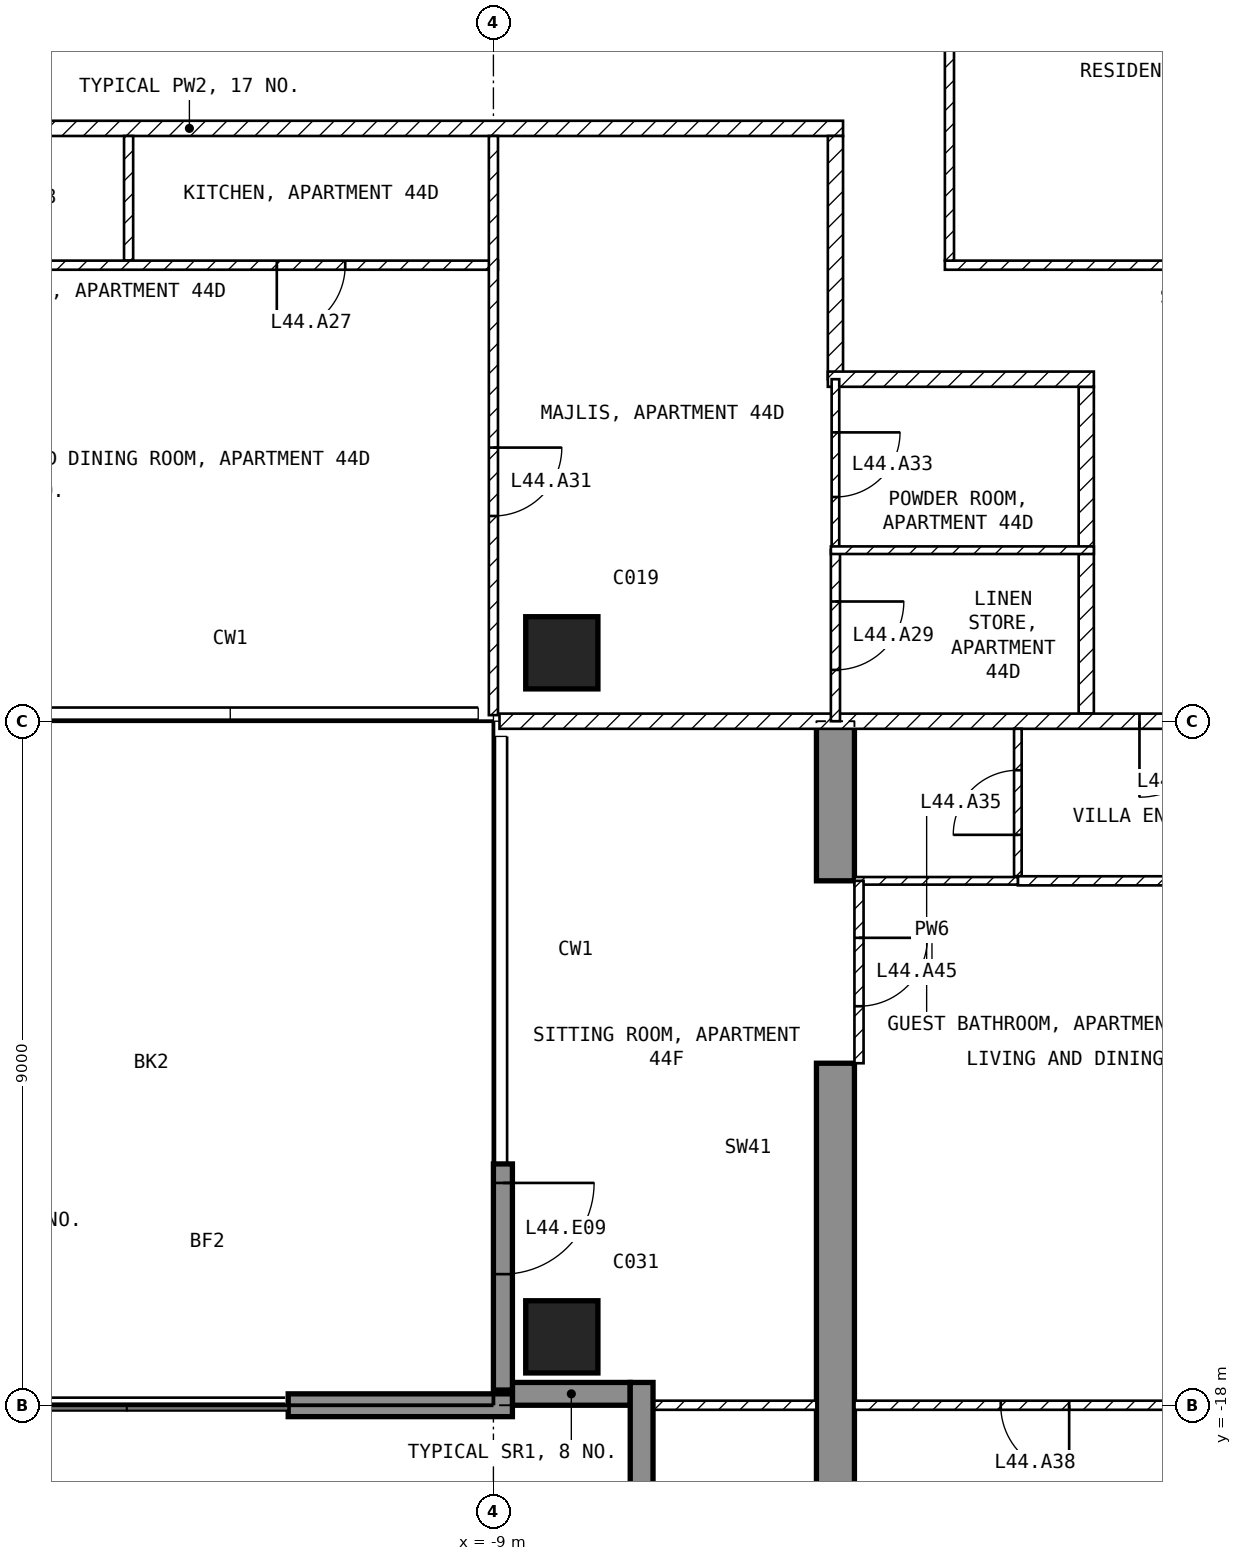
"""IFC4 building model, lengths in metres.
Left out: names, types, materials, properties, quantities, classifications, styles, units other than length and angle.
Written with IfcOpenShell. Run it as: python <this file> out.ifc"""

import sys

from ifc_helpers import new_model, si_unit, direction, frame, frame_2d, origin, origin_2d, place, context, subcontext, project, spatial, polyline, rectangle, outline, extrude, element, fill, save


model = new_model("IFC4")
c1 = context("Model", 3, precision=1e-05, world=origin(), true_north=direction((0.0, 1.0)))
c2 = subcontext(c1, "Body", "Model", "MODEL_VIEW")
j1 = project(units=[si_unit("LENGTHUNIT", "METRE"), si_unit("PLANEANGLEUNIT", "RADIAN")], contexts=[c1])
p1 = place(None, origin())
s1 = spatial("IfcSite", under=j1, at=p1, CompositionType="ELEMENT")
p2 = place(p1, origin())
s2 = spatial("IfcBuilding", under=s1, at=p2, CompositionType="ELEMENT")
p3 = place(p2, frame((0.0, 0.0, 180.6)))
s3 = spatial("IfcBuildingStorey", under=s2, at=p3, CompositionType="ELEMENT", Elevation=180.6)
for number, where, z_axis, x_axis in (
    (1, (-8.1, -17.1, -0.25), (0.0, 0.0, 1.0), (1.0, 0.0, 0.0)),
    (2, (-8.1, -8.1, -0.25), (0.0, 0.0, 1.0), (1.0, 0.0, 0.0)),
):
    element("IfcColumn", number, at=place(p3, frame(where, z_axis=z_axis, x_axis=x_axis)), inside=s3, PredefinedType="COLUMN", context=c2, shape_type="SweptSolid", body=[
        extrude(rectangle(XDim=0.95, YDim=0.95, at=origin_2d()), origin(), (0.0, 0.0, 1.0), 3.5),
    ])
p4 = place(p3, frame((-4.75, -20.225, -0.25), z_axis=(1.0, 0.0, 0.0), x_axis=(0.0, 1.0, 0.0)))
e3 = element("IfcWall", 3, at=p4, inside=s3, PredefinedType="SHEAR", context=c2, shape_type="SweptSolid", body=[
    extrude(outline(polyline([(0.0, 0.0), (6.725, 0.0), (6.725, 2.65), (9.125, 2.65), (9.125, 0.0), (11.225, 0.0), (11.225, 3.5), (0.0, 3.5), (0.0, 0.0)])), origin(), (0.0, 0.0, 1.0), 0.5),
])
p5 = place(p3, frame((-8.875, -14.825, 0.0), z_axis=(0.0, 0.0, 1.0), x_axis=(0.0, -1.0, 0.0)))
e4 = element("IfcWall", 4, at=p5, inside=s3, PredefinedType="SOLIDWALL", context=c2, shape_type="SweptSolid", body=[
    extrude(rectangle(XDim=2.975, YDim=0.25, at=frame_2d((1.488, 0.0))), origin(), (0.0, 0.0, 1.0), 3.25),
])
p6 = place(p5, frame((0.25, 0.0, 0.0)))
e5 = element("IfcOpeningElement", 5, at=p6, cuts=e4, PredefinedType="OPENING", context=c2, shape_type="SweptSolid", body=[
    extrude(rectangle(XDim=1.2, YDim=2.4, at=frame_2d((0.6, 1.2))), frame((0.0, 0.135, 0.0), z_axis=(0.0, -1.0, 0.0), x_axis=(1.0, 0.0, 0.0)), (0.0, 0.0, 1.0), 0.27),
])
p7 = place(p3, frame((-8.75, -17.85, 0.0), z_axis=(0.0, 0.0, 1.0), x_axis=(1.0, 0.0, 0.0)))
e6 = element("IfcWall", 6, at=p7, inside=s3, PredefinedType="SOLIDWALL", context=c2, shape_type="SweptSolid", body=[
    extrude(rectangle(XDim=1.55, YDim=0.3, at=frame_2d((0.775, 0.0))), origin(), (0.0, 0.0, 1.0), 3.25),
])
p8 = place(p3, frame((-7.05, -17.7, 0.0), z_axis=(0.0, 0.0, 1.0), x_axis=(0.0, -1.0, 0.0)))
e7 = element("IfcWall", 7, at=p8, inside=s3, PredefinedType="SOLIDWALL", context=c2, shape_type="SweptSolid", body=[
    extrude(rectangle(XDim=1.8, YDim=0.3, at=frame_2d((0.9, 0.0))), origin(), (0.0, 0.0, 1.0), 3.25),
])
p9 = place(p3, frame((-8.75, -18.0, 0.0), z_axis=(0.0, 0.0, 1.0), x_axis=(-1.0, 0.0, 0.0)))
e8 = element("IfcWall", 8, at=p9, inside=s3, PredefinedType="SOLIDWALL", context=c2, shape_type="SweptSolid", body=[
    extrude(rectangle(XDim=2.95, YDim=0.3, at=frame_2d((1.475, 0.0))), origin(), (0.0, 0.0, 1.0), 3.25),
])
p10 = place(p3, frame((-3.06, -3.0, 0.0), z_axis=(0.0, 0.0, 1.0), x_axis=(1.0, 0.0, 0.0)))
e9 = element("IfcWall", 9, at=p10, inside=s3, PredefinedType="PARTITIONING", context=c2, shape_type="SweptSolid", body=[
    extrude(rectangle(XDim=6.12, YDim=0.12, at=frame_2d((3.06, 0.0))), origin(), (0.0, 0.0, 1.0), 3.25),
])
p11 = place(p3, frame((-3.0, 2.94, 0.0), z_axis=(0.0, 0.0, 1.0), x_axis=(0.0, -1.0, 0.0)))
e10 = element("IfcWall", 10, at=p11, inside=s3, PredefinedType="PARTITIONING", context=c2, shape_type="SweptSolid", body=[
    extrude(rectangle(XDim=5.88, YDim=0.12, at=frame_2d((2.94, 0.0))), origin(), (0.0, 0.0, 1.0), 3.25),
])
p12 = place(p3, frame((-4.4, -1.2, 0.0), z_axis=(0.0, 0.0, 1.0), x_axis=(-1.0, 0.0, 0.0)))
e11 = element("IfcWall", 11, at=p12, inside=s3, PredefinedType="PARTITIONING", context=c2, shape_type="SweptSolid", body=[
    extrude(rectangle(XDim=17.2, YDim=0.2, at=frame_2d((8.6, 0.0))), origin(), (0.0, 0.0, 1.0), 3.25),
])
p13 = place(p12, frame((12.35, 0.0, 0.0)))
e12 = element("IfcOpeningElement", 12, at=p13, cuts=e11, PredefinedType="OPENING", context=c2, shape_type="SweptSolid", body=[
    extrude(rectangle(XDim=1.0, YDim=2.1, at=frame_2d((0.5, 1.05))), frame((0.0, 0.11, 0.0), z_axis=(0.0, -1.0, 0.0), x_axis=(1.0, 0.0, 0.0)), (0.0, 0.0, 1.0), 0.22),
])
p14 = place(p3, frame((-4.5, -4.5, 0.0), z_axis=(0.0, 0.0, 1.0), x_axis=(0.0, 1.0, 0.0)))
e13 = element("IfcWall", 13, at=p14, inside=s3, PredefinedType="PARTITIONING", context=c2, shape_type="SweptSolid", body=[
    extrude(rectangle(XDim=3.2, YDim=0.2, at=frame_2d((1.6, 0.0))), origin(), (0.0, 0.0, 1.0), 3.25),
])
p15 = place(p3, frame((-1.2, -8.9, 0.0), z_axis=(0.0, 0.0, 1.0), x_axis=(0.0, 1.0, 0.0)))
e14 = element("IfcWall", 14, at=p15, inside=s3, PredefinedType="PARTITIONING", context=c2, shape_type="SweptSolid", body=[
    extrude(rectangle(XDim=4.3, YDim=0.2, at=frame_2d((2.15, 0.0))), origin(), (0.0, 0.0, 1.0), 3.25),
])
p16 = place(p3, frame((-1.1, -4.5, 0.0), z_axis=(0.0, 0.0, 1.0), x_axis=(-1.0, 0.0, 0.0)))
e15 = element("IfcWall", 15, at=p16, inside=s3, PredefinedType="PARTITIONING", context=c2, shape_type="SweptSolid", body=[
    extrude(rectangle(XDim=3.5, YDim=0.2, at=frame_2d((1.75, 0.0))), origin(), (0.0, 0.0, 1.0), 3.25),
])
p17 = place(p3, frame((8.92, -9.0, 0.0), z_axis=(0.0, 0.0, 1.0), x_axis=(-1.0, 0.0, 0.0)))
e16 = element("IfcWall", 16, at=p17, inside=s3, PredefinedType="PARTITIONING", context=c2, shape_type="SweptSolid", body=[
    extrude(rectangle(XDim=17.84, YDim=0.2, at=frame_2d((8.92, 0.0))), origin(), (0.0, 0.0, 1.0), 3.25),
])
p18 = place(p17, frame((8.42, 0.0, 0.0)))
e17 = element("IfcOpeningElement", 17, at=p18, cuts=e16, PredefinedType="OPENING", context=c2, shape_type="SweptSolid", body=[
    extrude(rectangle(XDim=1.0, YDim=2.1, at=frame_2d((0.5, 1.05))), frame((0.0, 0.11, 0.0), z_axis=(0.0, -1.0, 0.0), x_axis=(1.0, 0.0, 0.0)), (0.0, 0.0, 1.0), 0.22),
])
p19 = place(p3, frame((-13.8, -2.94, 0.0), z_axis=(0.0, 0.0, 1.0), x_axis=(0.0, 1.0, 0.0)))
e18 = element("IfcWall", 18, at=p19, inside=s3, PredefinedType="PARTITIONING", context=c2, shape_type="SweptSolid", body=[
    extrude(rectangle(XDim=1.64, YDim=0.12, at=frame_2d((0.82, 0.0))), origin(), (0.0, 0.0, 1.0), 3.25),
])
p20 = place(p3, frame((-8.94, -3.0, 0.0), z_axis=(0.0, 0.0, 1.0), x_axis=(-1.0, 0.0, 0.0)))
e19 = element("IfcWall", 19, at=p20, inside=s3, PredefinedType="PARTITIONING", context=c2, shape_type="SweptSolid", body=[
    extrude(rectangle(XDim=9.51, YDim=0.12, at=frame_2d((4.755, 0.0))), origin(), (0.0, 0.0, 1.0), 3.25),
])
p21 = place(p20, frame((2.01, 0.0, 0.0)))
e20 = element("IfcOpeningElement", 20, at=p21, cuts=e19, PredefinedType="OPENING", context=c2, shape_type="SweptSolid", body=[
    extrude(rectangle(XDim=0.9, YDim=2.1, at=frame_2d((0.45, 1.05))), frame((0.0, 0.07, 0.0), z_axis=(0.0, -1.0, 0.0), x_axis=(1.0, 0.0, 0.0)), (0.0, 0.0, 1.0), 0.14),
])
p22 = place(p20, frame((7.635, 0.0, 0.0)))
e21 = element("IfcOpeningElement", 21, at=p22, cuts=e19, PredefinedType="OPENING", context=c2, shape_type="SweptSolid", body=[
    extrude(rectangle(XDim=0.9, YDim=2.1, at=frame_2d((0.45, 1.05))), frame((0.0, 0.07, 0.0), z_axis=(0.0, -1.0, 0.0), x_axis=(1.0, 0.0, 0.0)), (0.0, 0.0, 1.0), 0.14),
])
p23 = place(p3, frame((-9.0, -1.3, 0.0), z_axis=(0.0, 0.0, 1.0), x_axis=(0.0, -1.0, 0.0)))
e22 = element("IfcWall", 22, at=p23, inside=s3, PredefinedType="PARTITIONING", context=c2, shape_type="SweptSolid", body=[
    extrude(rectangle(XDim=7.62, YDim=0.12, at=frame_2d((3.81, 0.0))), origin(), (0.0, 0.0, 1.0), 3.25),
])
p24 = place(p23, frame((4.1, 0.0, 0.0)))
e23 = element("IfcOpeningElement", 23, at=p24, cuts=e22, PredefinedType="OPENING", context=c2, shape_type="SweptSolid", body=[
    extrude(rectangle(XDim=0.9, YDim=2.1, at=frame_2d((0.45, 1.05))), frame((0.0, 0.07, 0.0), z_axis=(0.0, -1.0, 0.0), x_axis=(1.0, 0.0, 0.0)), (0.0, 0.0, 1.0), 0.14),
])
p25 = place(p3, frame((-4.5, -4.5, 0.0), z_axis=(0.0, 0.0, 1.0), x_axis=(0.0, -1.0, 0.0)))
e24 = element("IfcWall", 24, at=p25, inside=s3, PredefinedType="PARTITIONING", context=c2, shape_type="SweptSolid", body=[
    extrude(rectangle(XDim=2.25, YDim=0.1, at=frame_2d((1.125, 0.0))), origin(), (0.0, 0.0, 1.0), 3.25),
])
p26 = place(p25, frame((0.7, 0.0, 0.0)))
e25 = element("IfcOpeningElement", 25, at=p26, cuts=e24, PredefinedType="OPENING", context=c2, shape_type="SweptSolid", body=[
    extrude(rectangle(XDim=0.85, YDim=2.1, at=frame_2d((0.425, 1.05))), frame((0.0, 0.06, 0.0), z_axis=(0.0, -1.0, 0.0), x_axis=(1.0, 0.0, 0.0)), (0.0, 0.0, 1.0), 0.12),
])
p27 = place(p3, frame((-4.5, -6.75, 0.0), z_axis=(0.0, 0.0, 1.0), x_axis=(0.0, -1.0, 0.0)))
e26 = element("IfcWall", 26, at=p27, inside=s3, PredefinedType="PARTITIONING", context=c2, shape_type="SweptSolid", body=[
    extrude(rectangle(XDim=2.25, YDim=0.12, at=frame_2d((1.125, 0.0))), origin(), (0.0, 0.0, 1.0), 3.25),
])
p28 = place(p27, frame((0.675, 0.0, 0.0)))
e27 = element("IfcOpeningElement", 27, at=p28, cuts=e26, PredefinedType="OPENING", context=c2, shape_type="SweptSolid", body=[
    extrude(rectangle(XDim=0.9, YDim=2.1, at=frame_2d((0.45, 1.05))), frame((0.0, 0.07, 0.0), z_axis=(0.0, -1.0, 0.0), x_axis=(1.0, 0.0, 0.0)), (0.0, 0.0, 1.0), 0.14),
])
p29 = place(p3, frame((-1.1, -6.75, 0.0), z_axis=(0.0, 0.0, 1.0), x_axis=(-1.0, 0.0, 0.0)))
e28 = element("IfcWall", 28, at=p29, inside=s3, PredefinedType="PARTITIONING", context=c2, shape_type="SweptSolid", body=[
    extrude(rectangle(XDim=3.46, YDim=0.1, at=frame_2d((1.73, 0.0))), origin(), (0.0, 0.0, 1.0), 3.25),
])
p30 = place(p3, frame((-2.1, -11.04, 0.0), z_axis=(0.0, 0.0, 1.0), x_axis=(0.0, 1.0, 0.0)))
e29 = element("IfcWall", 29, at=p30, inside=s3, PredefinedType="PARTITIONING", context=c2, shape_type="SweptSolid", body=[
    extrude(rectangle(XDim=1.94, YDim=0.1, at=frame_2d((0.97, 0.0))), origin(), (0.0, 0.0, 1.0), 3.25),
])
p31 = place(p30, frame((0.545, 0.0, 0.0)))
e30 = element("IfcOpeningElement", 30, at=p31, cuts=e29, PredefinedType="OPENING", context=c2, shape_type="SweptSolid", body=[
    extrude(rectangle(XDim=0.85, YDim=2.1, at=frame_2d((0.425, 1.05))), frame((0.0, 0.06, 0.0), z_axis=(0.0, -1.0, 0.0), x_axis=(1.0, 0.0, 0.0)), (0.0, 0.0, 1.0), 0.12),
])
p32 = place(p3, frame((4.25, -11.1, 0.0), z_axis=(0.0, 0.0, 1.0), x_axis=(-1.0, 0.0, 0.0)))
e31 = element("IfcWall", 31, at=p32, inside=s3, PredefinedType="PARTITIONING", context=c2, shape_type="SweptSolid", body=[
    extrude(rectangle(XDim=6.35, YDim=0.12, at=frame_2d((3.175, 0.0))), origin(), (0.0, 0.0, 1.0), 3.25),
])
p33 = place(p32, frame((2.725, 0.0, 0.0)))
e32 = element("IfcOpeningElement", 32, at=p33, cuts=e31, PredefinedType="OPENING", context=c2, shape_type="SweptSolid", body=[
    extrude(rectangle(XDim=0.9, YDim=2.1, at=frame_2d((0.45, 1.05))), frame((0.0, 0.07, 0.0), z_axis=(0.0, -1.0, 0.0), x_axis=(1.0, 0.0, 0.0)), (0.0, 0.0, 1.0), 0.14),
])
p34 = place(p3, frame((-2.1, -11.1, 0.0), z_axis=(0.0, 0.0, 1.0), x_axis=(-1.0, 0.0, 0.0)))
e33 = element("IfcWall", 33, at=p34, inside=s3, PredefinedType="PARTITIONING", context=c2, shape_type="SweptSolid", body=[
    extrude(rectangle(XDim=2.15, YDim=0.1, at=frame_2d((1.075, 0.0))), origin(), (0.0, 0.0, 1.0), 3.25),
])
p35 = place(p3, frame((4.25, -18.0, 0.0), z_axis=(0.0, 0.0, 1.0), x_axis=(-1.0, 0.0, 0.0)))
e34 = element("IfcWall", 34, at=p35, inside=s3, PredefinedType="PARTITIONING", context=c2, shape_type="SweptSolid", body=[
    extrude(rectangle(XDim=8.5, YDim=0.12, at=frame_2d((4.25, 0.0))), origin(), (0.0, 0.0, 1.0), 3.25),
])
p36 = place(p35, frame((5.675, 0.0, 0.0)))
e35 = element("IfcOpeningElement", 35, at=p36, cuts=e34, PredefinedType="OPENING", context=c2, shape_type="SweptSolid", body=[
    extrude(rectangle(XDim=0.9, YDim=2.1, at=frame_2d((0.45, 1.05))), frame((0.0, 0.07, 0.0), z_axis=(0.0, -1.0, 0.0), x_axis=(1.0, 0.0, 0.0)), (0.0, 0.0, 1.0), 0.14),
])
p37 = place(p3, frame((-4.75, -18.0, 0.0), z_axis=(0.0, 0.0, 1.0), x_axis=(-1.0, 0.0, 0.0)))
e36 = element("IfcWall", 36, at=p37, inside=s3, PredefinedType="PARTITIONING", context=c2, shape_type="SweptSolid", body=[
    extrude(rectangle(XDim=2.37, YDim=0.12, at=frame_2d((1.185, 0.0))), origin(), (0.0, 0.0, 1.0), 3.25),
])
p38 = place(p3, frame((-4.19, -11.1, 0.0), z_axis=(0.0, 0.0, 1.0), x_axis=(0.0, -1.0, 0.0)))
e37 = element("IfcWall", 37, at=p38, inside=s3, PredefinedType="PARTITIONING", context=c2, shape_type="SweptSolid", body=[
    extrude(rectangle(XDim=2.4, YDim=0.12, at=frame_2d((1.2, 0.0))), origin(), (0.0, 0.0, 1.0), 2.4),
])
p39 = place(p38, frame((0.75, 0.0, 0.0)))
e38 = element("IfcOpeningElement", 38, at=p39, cuts=e37, PredefinedType="OPENING", context=c2, shape_type="SweptSolid", body=[
    extrude(rectangle(XDim=0.9, YDim=2.1, at=frame_2d((0.45, 1.05))), frame((0.0, 0.07, 0.0), z_axis=(0.0, -1.0, 0.0), x_axis=(1.0, 0.0, 0.0)), (0.0, 0.0, 1.0), 0.14),
])
p40 = place(p6, origin())
e39 = element("IfcDoor", 39, at=p40, inside=s3, OperationType="SINGLE_SWING_LEFT", PredefinedType="DOOR", context=c2, shape_type="SweptSolid", body=[
    extrude(rectangle(XDim=1.2, YDim=2.4, at=frame_2d((0.6, 1.2))), frame((0.0, 0.025, 0.0), z_axis=(0.0, -1.0, 0.0), x_axis=(1.0, 0.0, 0.0)), (0.0, 0.0, 1.0), 0.05),
])
fill(e5, e39)
p41 = place(p21, origin())
e40 = element("IfcDoor", 40, at=p41, inside=s3, OperationType="SINGLE_SWING_RIGHT", PredefinedType="DOOR", context=c2, shape_type="SweptSolid", body=[
    extrude(rectangle(XDim=0.9, YDim=2.1, at=frame_2d((0.45, 1.05))), frame((0.0, 0.025, 0.0), z_axis=(0.0, -1.0, 0.0), x_axis=(1.0, 0.0, 0.0)), (0.0, 0.0, 1.0), 0.05),
])
fill(e20, e40)
p42 = place(p28, origin())
e41 = element("IfcDoor", 41, at=p42, inside=s3, OperationType="SINGLE_SWING_LEFT", PredefinedType="DOOR", context=c2, shape_type="SweptSolid", body=[
    extrude(rectangle(XDim=0.9, YDim=2.1, at=frame_2d((0.45, 1.05))), frame((0.0, 0.025, 0.0), z_axis=(0.0, -1.0, 0.0), x_axis=(1.0, 0.0, 0.0)), (0.0, 0.0, 1.0), 0.05),
])
fill(e27, e41)
p43 = place(p24, origin())
e42 = element("IfcDoor", 42, at=p43, inside=s3, OperationType="SINGLE_SWING_LEFT", PredefinedType="DOOR", context=c2, shape_type="SweptSolid", body=[
    extrude(rectangle(XDim=0.9, YDim=2.1, at=frame_2d((0.45, 1.05))), frame((0.0, 0.025, 0.0), z_axis=(0.0, -1.0, 0.0), x_axis=(1.0, 0.0, 0.0)), (0.0, 0.0, 1.0), 0.05),
])
fill(e23, e42)
p44 = place(p26, origin())
e43 = element("IfcDoor", 43, at=p44, inside=s3, OperationType="SINGLE_SWING_LEFT", PredefinedType="DOOR", context=c2, shape_type="SweptSolid", body=[
    extrude(rectangle(XDim=0.85, YDim=2.1, at=frame_2d((0.425, 1.05))), frame((0.0, 0.025, 0.0), z_axis=(0.0, -1.0, 0.0), x_axis=(1.0, 0.0, 0.0)), (0.0, 0.0, 1.0), 0.05),
])
fill(e25, e43)
p45 = place(p18, origin())
e44 = element("IfcDoor", 44, at=p45, inside=s3, OperationType="SINGLE_SWING_RIGHT", PredefinedType="DOOR", context=c2, shape_type="SweptSolid", body=[
    extrude(rectangle(XDim=1.0, YDim=2.1, at=frame_2d((0.5, 1.05))), frame((0.0, 0.025, 0.0), z_axis=(0.0, -1.0, 0.0), x_axis=(1.0, 0.0, 0.0)), (0.0, 0.0, 1.0), 0.05),
])
fill(e17, e44)
p46 = place(p31, origin())
e45 = element("IfcDoor", 45, at=p46, inside=s3, OperationType="SINGLE_SWING_LEFT", PredefinedType="DOOR", context=c2, shape_type="SweptSolid", body=[
    extrude(rectangle(XDim=0.85, YDim=2.1, at=frame_2d((0.425, 1.05))), frame((0.0, 0.025, 0.0), z_axis=(0.0, -1.0, 0.0), x_axis=(1.0, 0.0, 0.0)), (0.0, 0.0, 1.0), 0.05),
])
fill(e30, e45)
p47 = place(p36, origin())
e46 = element("IfcDoor", 46, at=p47, inside=s3, OperationType="SINGLE_SWING_LEFT", PredefinedType="DOOR", context=c2, shape_type="SweptSolid", body=[
    extrude(rectangle(XDim=0.9, YDim=2.1, at=frame_2d((0.45, 1.05))), frame((0.0, 0.025, 0.0), z_axis=(0.0, -1.0, 0.0), x_axis=(1.0, 0.0, 0.0)), (0.0, 0.0, 1.0), 0.05),
])
fill(e35, e46)
p48 = place(p39, origin())
e47 = element("IfcDoor", 47, at=p48, inside=s3, OperationType="SINGLE_SWING_LEFT", PredefinedType="DOOR", context=c2, shape_type="SweptSolid", body=[
    extrude(rectangle(XDim=0.9, YDim=2.1, at=frame_2d((0.45, 1.05))), frame((0.0, 0.025, 0.0), z_axis=(0.0, -1.0, 0.0), x_axis=(1.0, 0.0, 0.0)), (0.0, 0.0, 1.0), 0.05),
])
fill(e38, e47)
save(model, sys.argv[1])
